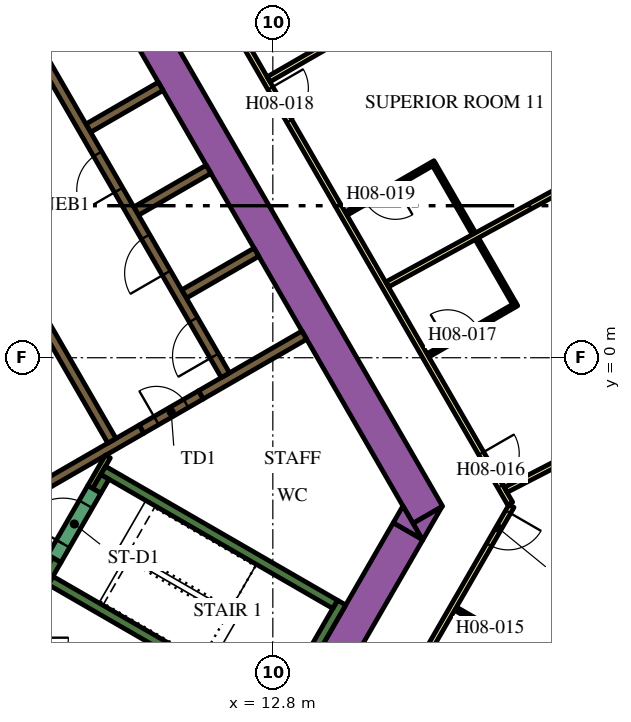
"""IFC4 building model, lengths in metres.
Left out: names, types, materials, properties, quantities, classifications, styles, units other than length and angle.
Written with IfcOpenShell. Run it as: python <this file> out.ifc"""

import sys

from ifc_helpers import new_model, si_unit, direction, frame, frame_2d, origin, place, context, subcontext, project, spatial, polyline, rectangle, outline, extrude, element, fill, save


model = new_model("IFC4")
c1 = context("Model", 3, precision=1e-05, world=origin(), true_north=direction((0.0, 1.0)))
c2 = subcontext(c1, "Body", "Model", "MODEL_VIEW")
j1 = project(units=[si_unit("LENGTHUNIT", "METRE"), si_unit("PLANEANGLEUNIT", "RADIAN")], contexts=[c1])
p1 = place(None, origin())
s1 = spatial("IfcSite", under=j1, at=p1, CompositionType="ELEMENT")
p2 = place(p1, origin())
s2 = spatial("IfcBuilding", under=s1, at=p2, CompositionType="ELEMENT")
p3 = place(p2, frame((0.0, 0.0, 114.9)))
s3 = spatial("IfcBuildingStorey", under=s2, at=p3, CompositionType="ELEMENT", Elevation=114.9)
p4 = place(p3, frame((6.776, 13.364, 0.0), z_axis=(0.0, 0.0, 1.0), x_axis=(0.500004177138, -0.8660229921, 0.0)))
e1 = element("IfcWall", 1, at=p4, inside=s3, PredefinedType="SOLIDWALL", context=c2, shape_type="SweptSolid", body=[
    extrude(rectangle(XDim=20.204, YDim=0.9, at=frame_2d((10.102, 0.0))), origin(), (0.0, 0.0, 1.0), 3.9),
])
p5 = place(p3, origin())
e2 = element("IfcWall", 2, at=p5, inside=s3, PredefinedType="SOLIDWALL", context=c2, shape_type="SweptSolid", body=[
    extrude(outline(polyline([(16.743, -4.8), (16.489, -4.36), (17.251, -3.92), (16.743, -4.8)])), origin(), (0.0, 0.0, 1.0), 3.9),
])
p6 = place(p3, frame((11.943, -12.214, 0.0), z_axis=(0.0, 0.0, 1.0), x_axis=(0.49998092645, 0.866036415623, 0.0)))
e3 = element("IfcWall", 3, at=p6, inside=s3, PredefinedType="SOLIDWALL", context=c2, shape_type="SweptSolid", body=[
    extrude(rectangle(XDim=8.83, YDim=0.9, at=frame_2d((4.415, 0.0))), origin(), (0.0, 0.0, 1.0), 3.9),
])
e4 = element("IfcWall", 4, at=p5, inside=s3, PredefinedType="SOLIDWALL", context=c2, shape_type="SweptSolid", body=[
    extrude(outline(polyline([(16.223, -3.9), (16.732, -4.78), (15.969, -4.34), (16.223, -3.9)])), origin(), (0.0, 0.0, 1.0), 3.9),
])
p7 = place(p3, frame((12.885, -9.431, 0.0), z_axis=(0.0, 0.0, 1.0), x_axis=(0.500020560727, 0.866013532718, 0.0)))
e5 = element("IfcWall", 5, at=p7, inside=s3, PredefinedType="SOLIDWALL", context=c2, shape_type="SweptSolid", body=[
    extrude(rectangle(XDim=3.45, YDim=0.25, at=frame_2d((1.725, 0.0))), origin(), (0.0, 0.0, 1.0), 3.9),
])
p8 = place(p3, frame((12.84, -9.261, 0.0), z_axis=(0.0, 0.0, 1.0), x_axis=(-0.866013990052, 0.500019768644, 0.0)))
e6 = element("IfcWall", 6, at=p8, inside=s3, PredefinedType="SOLIDWALL", context=c2, shape_type="SweptSolid", body=[
    extrude(rectangle(XDim=6.8, YDim=0.25, at=frame_2d((3.4, 0.0))), origin(), (0.0, 0.0, 1.0), 3.9),
])
p9 = place(p3, frame((6.78, -5.906, 0.0), z_axis=(0.0, 0.0, 1.0), x_axis=(0.500223362819, 0.865896406789, 0.0)))
e7 = element("IfcWall", 7, at=p9, inside=s3, PredefinedType="SOLIDWALL", context=c2, shape_type="SweptSolid", body=[
    extrude(rectangle(XDim=0.675, YDim=0.25, at=frame_2d((0.337, 0.0))), origin(), (0.0, 0.0, 1.0), 3.9),
])
p10 = place(p3, frame((8.334, -2.964, 0.0), z_axis=(0.0, 0.0, 1.0), x_axis=(0.866016039709, -0.500016218704, 0.0)))
e8 = element("IfcWall", 8, at=p10, inside=s3, PredefinedType="SOLIDWALL", context=c2, shape_type="SweptSolid", body=[
    extrude(rectangle(XDim=7.05, YDim=0.25, at=frame_2d((3.525, 0.0))), origin(), (0.0, 0.0, 1.0), 3.9),
])
p11 = place(p3, frame((8.168, -3.503, 0.0), z_axis=(0.0, 0.0, 1.0), x_axis=(0.49972245349, 0.866185586049, 0.0)))
e9 = element("IfcWall", 9, at=p11, inside=s3, PredefinedType="SOLIDWALL", context=c2, shape_type="SweptSolid", body=[
    extrude(rectangle(XDim=0.425, YDim=0.25, at=frame_2d((0.212, 0.0))), origin(), (0.0, 0.0, 1.0), 3.9),
])
p12 = place(p3, frame((10.464, 1.677, 0.0), z_axis=(0.0, 0.0, 1.0), x_axis=(0.86605622881, 0.499946605688, 0.0)))
e10 = element("IfcWall", 10, at=p12, inside=s3, PredefinedType="SOLIDWALL", context=c2, shape_type="SweptSolid", body=[
    extrude(rectangle(XDim=2.2, YDim=0.25, at=frame_2d((1.1, 0.0))), origin(), (0.0, 0.0, 1.0), 3.9),
])
p13 = place(p3, frame((13.629, 0.594, 0.0), z_axis=(0.0, 0.0, 1.0), x_axis=(-0.86602790099, -0.499995674689, 0.0)))
e11 = element("IfcWall", 11, at=p13, inside=s3, PredefinedType="SOLIDWALL", context=c2, shape_type="SweptSolid", body=[
    extrude(rectangle(XDim=3.146, YDim=0.25, at=frame_2d((1.573, 0.0))), origin(), (0.0, 0.0, 1.0), 3.9),
])
p14 = place(p3, frame((9.346, -1.879, 0.0), z_axis=(0.0, 0.0, 1.0), x_axis=(-0.866048528039, -0.499959945477, 0.0)))
e12 = element("IfcWall", 12, at=p14, inside=s3, PredefinedType="SOLIDWALL", context=c2, shape_type="SweptSolid", body=[
    extrude(rectangle(XDim=3.47, YDim=0.25, at=frame_2d((1.735, 0.0))), origin(), (0.0, 0.0, 1.0), 3.9),
])
for number, where, z_axis, x_axis in (
    (13, (9.204, 3.859, 0.0), (0.0, 0.0, 1.0), (0.866, 0.5, 0.0)),
    (14, (7.944, 6.041, 0.0), (0.0, 0.0, 1.0), (0.866, 0.5, 0.0)),
):
    element("IfcWall", number, at=place(p3, frame(where, z_axis=z_axis, x_axis=x_axis)), inside=s3, PredefinedType="SOLIDWALL", context=c2, shape_type="SweptSolid", body=[
        extrude(rectangle(XDim=2.2, YDim=0.25, at=frame_2d((1.1, 0.0))), origin(), (0.0, 0.0, 1.0), 3.9),
    ])
p15 = place(p3, frame((6.945, -5.222, 0.0), z_axis=(0.0, 0.0, 1.0), x_axis=(-0.499818422106, -0.866130212453, 0.0)))
e15 = element("IfcWall", 15, at=p15, inside=s3, PredefinedType="PARTITIONING", context=c2, shape_type="SweptSolid", body=[
    extrude(rectangle(XDim=0.514, YDim=0.15, at=frame_2d((0.257, 0.0))), origin(), (0.0, 0.0, 1.0), 2.75),
])
p16 = place(p3, frame((8.459, -2.599, 0.0), z_axis=(0.0, 0.0, 1.0), x_axis=(-0.500041054325, -0.866001699761, 0.0)))
e16 = element("IfcWall", 16, at=p16, inside=s3, PredefinedType="PARTITIONING", context=c2, shape_type="SweptSolid", body=[
    extrude(rectangle(XDim=0.929, YDim=0.15, at=frame_2d((0.464, 0.0))), origin(), (0.0, 0.0, 1.0), 3.9),
])
p17 = place(p3, frame((11.553, -0.46, 0.0), z_axis=(0.0, 0.0, 1.0), x_axis=(-0.500006514828, 0.866021642414, 0.0)))
e17 = element("IfcWall", 17, at=p17, inside=s3, PredefinedType="SOLIDWALL", context=c2, shape_type="SweptSolid", body=[
    extrude(rectangle(XDim=12.35, YDim=0.25, at=frame_2d((6.175, 0.0))), origin(), (0.0, 0.0, 1.0), 3.9),
])
p18 = place(p17, frame((0.585, 0.0, 0.0)))
e18 = element("IfcOpeningElement", 18, at=p18, cuts=e17, PredefinedType="OPENING", context=c2, shape_type="SweptSolid", body=[
    extrude(rectangle(XDim=1.1, YDim=2.1, at=frame_2d((0.55, 1.05))), frame((0.0, 0.135, 0.0), z_axis=(0.0, -1.0, 0.0), x_axis=(1.0, 0.0, 0.0)), (0.0, 0.0, 1.0), 0.27),
])
p19 = place(p17, frame((3.105, 0.0, 0.0)))
e19 = element("IfcOpeningElement", 19, at=p19, cuts=e17, PredefinedType="OPENING", context=c2, shape_type="SweptSolid", body=[
    extrude(rectangle(XDim=1.1, YDim=2.1, at=frame_2d((0.55, 1.05))), frame((0.0, 0.135, 0.0), z_axis=(0.0, -1.0, 0.0), x_axis=(1.0, 0.0, 0.0)), (0.0, 0.0, 1.0), 0.27),
])
p20 = place(p17, frame((5.625, 0.0, 0.0)))
e20 = element("IfcOpeningElement", 20, at=p20, cuts=e17, PredefinedType="OPENING", context=c2, shape_type="SweptSolid", body=[
    extrude(rectangle(XDim=1.1, YDim=2.1, at=frame_2d((0.55, 1.05))), frame((0.0, 0.135, 0.0), z_axis=(0.0, -1.0, 0.0), x_axis=(1.0, 0.0, 0.0)), (0.0, 0.0, 1.0), 0.27),
])
p21 = place(p3, frame((8.565, -2.185, 0.0), z_axis=(0.0, 0.0, 1.0), x_axis=(-0.499997954832, 0.866026584559, 0.0)))
e21 = element("IfcWall", 21, at=p21, inside=s3, PredefinedType="SOLIDWALL", context=c2, shape_type="SweptSolid", body=[
    extrude(rectangle(XDim=12.35, YDim=0.25, at=frame_2d((6.175, 0.0))), origin(), (0.0, 0.0, 1.0), 3.9),
])
p22 = place(p21, frame((5.725, 0.0, 0.0)))
e22 = element("IfcOpeningElement", 22, at=p22, cuts=e21, PredefinedType="OPENING", context=c2, shape_type="SweptSolid", body=[
    extrude(rectangle(XDim=0.9, YDim=2.1, at=frame_2d((0.45, 1.05))), frame((0.0, 0.135, 0.0), z_axis=(0.0, -1.0, 0.0), x_axis=(1.0, 0.0, 0.0)), (0.0, 0.0, 1.0), 0.27),
])
p23 = place(p3, frame((7.053, -5.284, 0.0), z_axis=(0.0, 0.0, 1.0), x_axis=(0.500078061341, 0.865980330357, 0.0)))
e23 = element("IfcWall", 23, at=p23, inside=s3, PredefinedType="SOLIDWALL", context=c2, shape_type="SweptSolid", body=[
    extrude(rectangle(XDim=2.1, YDim=0.4, at=frame_2d((1.05, 0.0))), origin(), (0.0, 0.0, 1.0), 3.9),
])
p24 = place(p23, frame((0.45, 0.0, 0.0)))
e24 = element("IfcOpeningElement", 24, at=p24, cuts=e23, PredefinedType="OPENING", context=c2, shape_type="SweptSolid", body=[
    extrude(rectangle(XDim=1.2, YDim=2.1, at=frame_2d((0.6, 1.05))), frame((0.0, 0.21, 0.0), z_axis=(0.0, -1.0, 0.0), x_axis=(1.0, 0.0, 0.0)), (0.0, 0.0, 1.0), 0.42),
])
p25 = place(p3, frame((9.346, -1.879, 0.0), z_axis=(0.0, 0.0, 1.0), x_axis=(0.866047807691, 0.499961193289, 0.0)))
e25 = element("IfcWall", 25, at=p25, inside=s3, PredefinedType="SOLIDWALL", context=c2, shape_type="SweptSolid", body=[
    extrude(rectangle(XDim=1.8, YDim=0.25, at=frame_2d((0.9, 0.0))), origin(), (0.0, 0.0, 1.0), 3.9),
])
p26 = place(p25, frame((0.45, 0.0, 0.0)))
e26 = element("IfcOpeningElement", 26, at=p26, cuts=e25, PredefinedType="OPENING", context=c2, shape_type="SweptSolid", body=[
    extrude(rectangle(XDim=0.9, YDim=2.1, at=frame_2d((0.45, 1.05))), frame((0.0, 0.135, 0.0), z_axis=(0.0, -1.0, 0.0), x_axis=(1.0, 0.0, 0.0)), (0.0, 0.0, 1.0), 0.27),
])
p27 = place(p3, frame((19.081, -3.9, 0.0), z_axis=(0.0, 0.0, 1.0), x_axis=(-0.499974327079, -0.866040225545, 0.0)))
e27 = element("IfcWall", 27, at=p27, inside=s3, PredefinedType="PARTITIONING", context=c2, shape_type="SweptSolid", body=[
    extrude(rectangle(XDim=5.258, YDim=0.15, at=frame_2d((2.629, 0.0))), origin(), (0.0, 0.0, 1.0), 2.75),
])
p28 = place(p27, frame((0.18, 0.0, 0.0)))
e28 = element("IfcOpeningElement", 28, at=p28, cuts=e27, PredefinedType="OPENING", context=c2, shape_type="SweptSolid", body=[
    extrude(rectangle(XDim=1.0, YDim=2.1, at=frame_2d((0.5, 1.05))), frame((0.0, 0.085, 0.0), z_axis=(0.0, -1.0, 0.0), x_axis=(1.0, 0.0, 0.0)), (0.0, 0.0, 1.0), 0.17),
])
p29 = place(p3, frame((6.163, 18.475, 0.0), z_axis=(0.0, 0.0, 1.0), x_axis=(0.500001317485, -0.866024643133, 0.0)))
e29 = element("IfcWall", 29, at=p29, inside=s3, PredefinedType="PARTITIONING", context=c2, shape_type="SweptSolid", body=[
    extrude(rectangle(XDim=25.767, YDim=0.15, at=frame_2d((12.883, 0.0))), origin(), (0.0, 0.0, 1.0), 2.75),
])
p30 = place(p29, frame((24.241, 0.0, 0.0)))
e30 = element("IfcOpeningElement", 30, at=p30, cuts=e29, PredefinedType="OPENING", context=c2, shape_type="SweptSolid", body=[
    extrude(rectangle(XDim=1.0, YDim=2.1, at=frame_2d((0.5, 1.05))), frame((0.0, 0.085, 0.0), z_axis=(0.0, -1.0, 0.0), x_axis=(1.0, 0.0, 0.0)), (0.0, 0.0, 1.0), 0.17),
])
p31 = place(p29, frame((13.144, 0.0, 0.0)))
e31 = element("IfcOpeningElement", 31, at=p31, cuts=e29, PredefinedType="OPENING", context=c2, shape_type="SweptSolid", body=[
    extrude(rectangle(XDim=1.0, YDim=2.1, at=frame_2d((0.5, 1.05))), frame((0.0, 0.085, 0.0), z_axis=(0.0, -1.0, 0.0), x_axis=(1.0, 0.0, 0.0)), (0.0, 0.0, 1.0), 0.17),
])
p32 = place(p29, frame((10.874, 0.0, 0.0)))
e32 = element("IfcOpeningElement", 32, at=p32, cuts=e29, PredefinedType="OPENING", context=c2, shape_type="SweptSolid", body=[
    extrude(rectangle(XDim=0.9, YDim=2.1, at=frame_2d((0.45, 1.05))), frame((0.0, 0.085, 0.0), z_axis=(0.0, -1.0, 0.0), x_axis=(1.0, 0.0, 0.0)), (0.0, 0.0, 1.0), 0.17),
])
p33 = place(p29, frame((3.718, 0.0, 0.0)))
e33 = element("IfcOpeningElement", 33, at=p33, cuts=e29, PredefinedType="OPENING", context=c2, shape_type="SweptSolid", body=[
    extrude(rectangle(XDim=1.0, YDim=2.1, at=frame_2d((0.5, 1.05))), frame((0.0, 0.085, 0.0), z_axis=(0.0, -1.0, 0.0), x_axis=(1.0, 0.0, 0.0)), (0.0, 0.0, 1.0), 0.17),
])
p34 = place(p29, frame((2.411, 0.0, 0.0)))
e34 = element("IfcOpeningElement", 34, at=p34, cuts=e29, PredefinedType="OPENING", context=c2, shape_type="SweptSolid", body=[
    extrude(rectangle(XDim=1.0, YDim=2.1, at=frame_2d((0.5, 1.05))), frame((0.0, 0.085, 0.0), z_axis=(0.0, -1.0, 0.0), x_axis=(1.0, 0.0, 0.0)), (0.0, 0.0, 1.0), 0.17),
])
p35 = place(p3, frame((18.484, 10.672, 0.0), z_axis=(0.0, 0.0, 1.0), x_axis=(-0.866019162053, -0.50001081084, 0.0)))
e35 = element("IfcWall", 35, at=p35, inside=s3, PredefinedType="PARTITIONING", context=c2, shape_type="SweptSolid", body=[
    extrude(rectangle(XDim=6.694, YDim=0.15, at=frame_2d((3.347, 0.0))), origin(), (0.0, 0.0, 1.0), 2.75),
])
p36 = place(p3, frame((21.614, 5.102, 0.0), z_axis=(0.0, 0.0, 1.0), x_axis=(-0.877484555087, -0.479604895287, 0.0)))
e36 = element("IfcWall", 36, at=p36, inside=s3, PredefinedType="PARTITIONING", context=c2, shape_type="SweptSolid", body=[
    extrude(rectangle(XDim=6.611, YDim=0.15, at=frame_2d((3.306, 0.0))), origin(), (0.0, 0.0, 1.0), 2.75),
])
p37 = place(p3, frame((24.613, -0.541, 0.0), z_axis=(0.0, 0.0, 1.0), x_axis=(-0.888459912519, -0.458954228487, 0.0)))
e37 = element("IfcWall", 37, at=p37, inside=s3, PredefinedType="PARTITIONING", context=c2, shape_type="SweptSolid", body=[
    extrude(rectangle(XDim=6.392, YDim=0.15, at=frame_2d((3.196, 0.0))), origin(), (0.0, 0.0, 1.0), 2.75),
])
p38 = place(p3, frame((27.478, -6.251, 0.0), z_axis=(0.0, 0.0, 1.0), x_axis=(-0.898940618603, -0.438070501432, 0.0)))
e38 = element("IfcWall", 38, at=p38, inside=s3, PredefinedType="PARTITIONING", context=c2, shape_type="SweptSolid", body=[
    extrude(rectangle(XDim=8.909, YDim=0.15, at=frame_2d((4.455, 0.0))), origin(), (0.0, 0.0, 1.0), 2.75),
])
p39 = place(p3, frame((19.946, -7.953, 0.0), z_axis=(0.0, 0.0, 1.0), x_axis=(-0.86599734893, 0.500048589285, 0.0)))
e39 = element("IfcWall", 39, at=p39, inside=s3, PredefinedType="PARTITIONING", context=c2, shape_type="SweptSolid", body=[
    extrude(rectangle(XDim=2.7, YDim=0.1, at=frame_2d((1.35, 0.0))), origin(), (0.0, 0.0, 1.0), 2.75),
])
p40 = place(p39, frame((1.2, 0.0, 0.0)))
e40 = element("IfcOpeningElement", 40, at=p40, cuts=e39, PredefinedType="OPENING", context=c2, shape_type="SweptSolid", body=[
    extrude(rectangle(XDim=0.9, YDim=2.1, at=frame_2d((0.45, 1.05))), frame((0.0, 0.06, 0.0), z_axis=(0.0, -1.0, 0.0), x_axis=(1.0, 0.0, 0.0)), (0.0, 0.0, 1.0), 0.12),
])
p41 = place(p3, frame((16.881, 0.061, 0.0), z_axis=(0.0, 0.0, 1.0), x_axis=(0.866019956843, 0.50000943426, 0.0)))
e41 = element("IfcWall", 41, at=p41, inside=s3, PredefinedType="PARTITIONING", context=c2, shape_type="SweptSolid", body=[
    extrude(rectangle(XDim=2.7, YDim=0.1, at=frame_2d((1.35, 0.0))), origin(), (0.0, 0.0, 1.0), 2.75),
])
p42 = place(p41, frame((0.6, 0.0, 0.0)))
e42 = element("IfcOpeningElement", 42, at=p42, cuts=e41, PredefinedType="OPENING", context=c2, shape_type="SweptSolid", body=[
    extrude(rectangle(XDim=0.9, YDim=2.1, at=frame_2d((0.45, 1.05))), frame((0.0, 0.06, 0.0), z_axis=(0.0, -1.0, 0.0), x_axis=(1.0, 0.0, 0.0)), (0.0, 0.0, 1.0), 0.12),
])
p43 = place(p3, frame((19.151, 1.429, 0.0), z_axis=(0.0, 0.0, 1.0), x_axis=(-0.500024377727, 0.866011328839, 0.0)))
e43 = element("IfcWall", 43, at=p43, inside=s3, PredefinedType="PARTITIONING", context=c2, shape_type="SweptSolid", body=[
    extrude(rectangle(XDim=1.96, YDim=0.1, at=frame_2d((0.98, 0.0))), origin(), (0.0, 0.0, 1.0), 2.75),
])
p44 = place(p3, frame((17.066, 5.141, 0.0), z_axis=(0.0, 0.0, 1.0), x_axis=(-0.866059108428, -0.4999416173, 0.0)))
e44 = element("IfcWall", 44, at=p44, inside=s3, PredefinedType="PARTITIONING", context=c2, shape_type="SweptSolid", body=[
    extrude(rectangle(XDim=2.7, YDim=0.1, at=frame_2d((1.35, 0.0))), origin(), (0.0, 0.0, 1.0), 2.75),
])
p45 = place(p44, frame((1.2, 0.0, 0.0)))
e45 = element("IfcOpeningElement", 45, at=p45, cuts=e44, PredefinedType="OPENING", context=c2, shape_type="SweptSolid", body=[
    extrude(rectangle(XDim=0.9, YDim=2.1, at=frame_2d((0.45, 1.05))), frame((0.0, 0.06, 0.0), z_axis=(0.0, -1.0, 0.0), x_axis=(1.0, 0.0, 0.0)), (0.0, 0.0, 1.0), 0.12),
])
p46 = place(p3, frame((17.047, 5.073, 0.0), z_axis=(0.0, 0.0, 1.0), x_axis=(0.500008976872, -0.866020220923, 0.0)))
e46 = element("IfcWall", 46, at=p46, inside=s3, PredefinedType="PARTITIONING", context=c2, shape_type="SweptSolid", body=[
    extrude(rectangle(XDim=2.09, YDim=0.1, at=frame_2d((1.045, 0.0))), origin(), (0.0, 0.0, 1.0), 2.75),
])
p47 = place(p3, frame((21.956, 6.033, 0.0), z_axis=(0.0, 0.0, 1.0), x_axis=(-0.48983164787, 0.87181704316, 0.0)))
e47 = element("IfcWall", 47, at=p47, inside=s3, PredefinedType="SOLIDWALL", context=c2, shape_type="SweptSolid", body=[
    extrude(rectangle(XDim=5.1, YDim=0.29, at=frame_2d((2.55, 0.0))), origin(), (0.0, 0.0, 1.0), 3.65),
])
p48 = place(p47, frame((0.273, 0.0, 0.9)))
e48 = element("IfcOpeningElement", 48, at=p48, cuts=e47, PredefinedType="OPENING", context=c2, shape_type="SweptSolid", body=[
    extrude(rectangle(XDim=1.35, YDim=2.15, at=frame_2d((0.675, 1.075))), frame((0.0, 0.155, 0.0), z_axis=(0.0, -1.0, 0.0), x_axis=(1.0, 0.0, 0.0)), (0.0, 0.0, 1.0), 0.31),
])
p49 = place(p47, frame((3.478, 0.0, 0.9)))
e49 = element("IfcOpeningElement", 49, at=p49, cuts=e47, PredefinedType="OPENING", context=c2, shape_type="SweptSolid", body=[
    extrude(rectangle(XDim=1.35, YDim=2.15, at=frame_2d((0.675, 1.075))), frame((0.0, 0.155, 0.0), z_axis=(0.0, -1.0, 0.0), x_axis=(1.0, 0.0, 0.0)), (0.0, 0.0, 1.0), 0.31),
])
p50 = place(p18, origin())
e50 = element("IfcDoor", 50, at=p50, inside=s3, OperationType="DOUBLE_DOOR_SLIDING", PredefinedType="DOOR", context=c2, shape_type="SweptSolid", body=[
    extrude(rectangle(XDim=1.1, YDim=2.1, at=frame_2d((0.55, 1.05))), frame((0.0, 0.025, 0.0), z_axis=(0.0, -1.0, 0.0), x_axis=(1.0, 0.0, 0.0)), (0.0, 0.0, 1.0), 0.05),
])
fill(e18, e50)
p51 = place(p19, origin())
e51 = element("IfcDoor", 51, at=p51, inside=s3, OperationType="DOUBLE_DOOR_SLIDING", PredefinedType="DOOR", context=c2, shape_type="SweptSolid", body=[
    extrude(rectangle(XDim=1.1, YDim=2.1, at=frame_2d((0.55, 1.05))), frame((0.0, 0.025, 0.0), z_axis=(0.0, -1.0, 0.0), x_axis=(1.0, 0.0, 0.0)), (0.0, 0.0, 1.0), 0.05),
])
fill(e19, e51)
p52 = place(p20, origin())
e52 = element("IfcDoor", 52, at=p52, inside=s3, OperationType="DOUBLE_DOOR_SLIDING", PredefinedType="DOOR", context=c2, shape_type="SweptSolid", body=[
    extrude(rectangle(XDim=1.1, YDim=2.1, at=frame_2d((0.55, 1.05))), frame((0.0, 0.025, 0.0), z_axis=(0.0, -1.0, 0.0), x_axis=(1.0, 0.0, 0.0)), (0.0, 0.0, 1.0), 0.05),
])
fill(e20, e52)
p53 = place(p24, origin())
e53 = element("IfcDoor", 53, at=p53, inside=s3, OperationType="SINGLE_SWING_LEFT", PredefinedType="DOOR", context=c2, shape_type="SweptSolid", body=[
    extrude(rectangle(XDim=1.2, YDim=2.1, at=frame_2d((0.6, 1.05))), frame((0.0, 0.025, 0.0), z_axis=(0.0, -1.0, 0.0), x_axis=(1.0, 0.0, 0.0)), (0.0, 0.0, 1.0), 0.05),
])
fill(e24, e53)
p54 = place(p26, origin())
e54 = element("IfcDoor", 54, at=p54, inside=s3, OperationType="SINGLE_SWING_LEFT", PredefinedType="DOOR", context=c2, shape_type="SweptSolid", body=[
    extrude(rectangle(XDim=0.9, YDim=2.1, at=frame_2d((0.45, 1.05))), frame((0.0, 0.025, 0.0), z_axis=(0.0, -1.0, 0.0), x_axis=(1.0, 0.0, 0.0)), (0.0, 0.0, 1.0), 0.05),
])
fill(e26, e54)
p55 = place(p28, origin())
e55 = element("IfcDoor", 55, at=p55, inside=s3, OperationType="SINGLE_SWING_LEFT", PredefinedType="DOOR", context=c2, shape_type="SweptSolid", body=[
    extrude(rectangle(XDim=1.0, YDim=2.1, at=frame_2d((0.5, 1.05))), frame((0.0, 0.025, 0.0), z_axis=(0.0, -1.0, 0.0), x_axis=(1.0, 0.0, 0.0)), (0.0, 0.0, 1.0), 0.05),
])
fill(e28, e55)
p56 = place(p40, origin())
e56 = element("IfcDoor", 56, at=p56, inside=s3, OperationType="SINGLE_SWING_RIGHT", PredefinedType="DOOR", context=c2, shape_type="SweptSolid", body=[
    extrude(rectangle(XDim=0.9, YDim=2.1, at=frame_2d((0.45, 1.05))), frame((0.0, 0.025, 0.0), z_axis=(0.0, -1.0, 0.0), x_axis=(1.0, 0.0, 0.0)), (0.0, 0.0, 1.0), 0.05),
])
fill(e40, e56)
p57 = place(p30, origin())
e57 = element("IfcDoor", 57, at=p57, inside=s3, OperationType="SINGLE_SWING_RIGHT", PredefinedType="DOOR", context=c2, shape_type="SweptSolid", body=[
    extrude(rectangle(XDim=1.0, YDim=2.1, at=frame_2d((0.5, 1.05))), frame((0.0, 0.025, 0.0), z_axis=(0.0, -1.0, 0.0), x_axis=(1.0, 0.0, 0.0)), (0.0, 0.0, 1.0), 0.05),
])
fill(e30, e57)
p58 = place(p42, origin())
e58 = element("IfcDoor", 58, at=p58, inside=s3, OperationType="SINGLE_SWING_LEFT", PredefinedType="DOOR", context=c2, shape_type="SweptSolid", body=[
    extrude(rectangle(XDim=0.9, YDim=2.1, at=frame_2d((0.45, 1.05))), frame((0.0, 0.025, 0.0), z_axis=(0.0, -1.0, 0.0), x_axis=(1.0, 0.0, 0.0)), (0.0, 0.0, 1.0), 0.05),
])
fill(e42, e58)
p59 = place(p31, origin())
e59 = element("IfcDoor", 59, at=p59, inside=s3, OperationType="SINGLE_SWING_LEFT", PredefinedType="DOOR", context=c2, shape_type="SweptSolid", body=[
    extrude(rectangle(XDim=1.0, YDim=2.1, at=frame_2d((0.5, 1.05))), frame((0.0, 0.025, 0.0), z_axis=(0.0, -1.0, 0.0), x_axis=(1.0, 0.0, 0.0)), (0.0, 0.0, 1.0), 0.05),
])
fill(e31, e59)
p60 = place(p45, origin())
e60 = element("IfcDoor", 60, at=p60, inside=s3, OperationType="SINGLE_SWING_LEFT", PredefinedType="DOOR", context=c2, shape_type="SweptSolid", body=[
    extrude(rectangle(XDim=0.9, YDim=2.1, at=frame_2d((0.45, 1.05))), frame((0.0, 0.025, 0.0), z_axis=(0.0, -1.0, 0.0), x_axis=(1.0, 0.0, 0.0)), (0.0, 0.0, 1.0), 0.05),
])
fill(e45, e60)
save(model, sys.argv[1])
